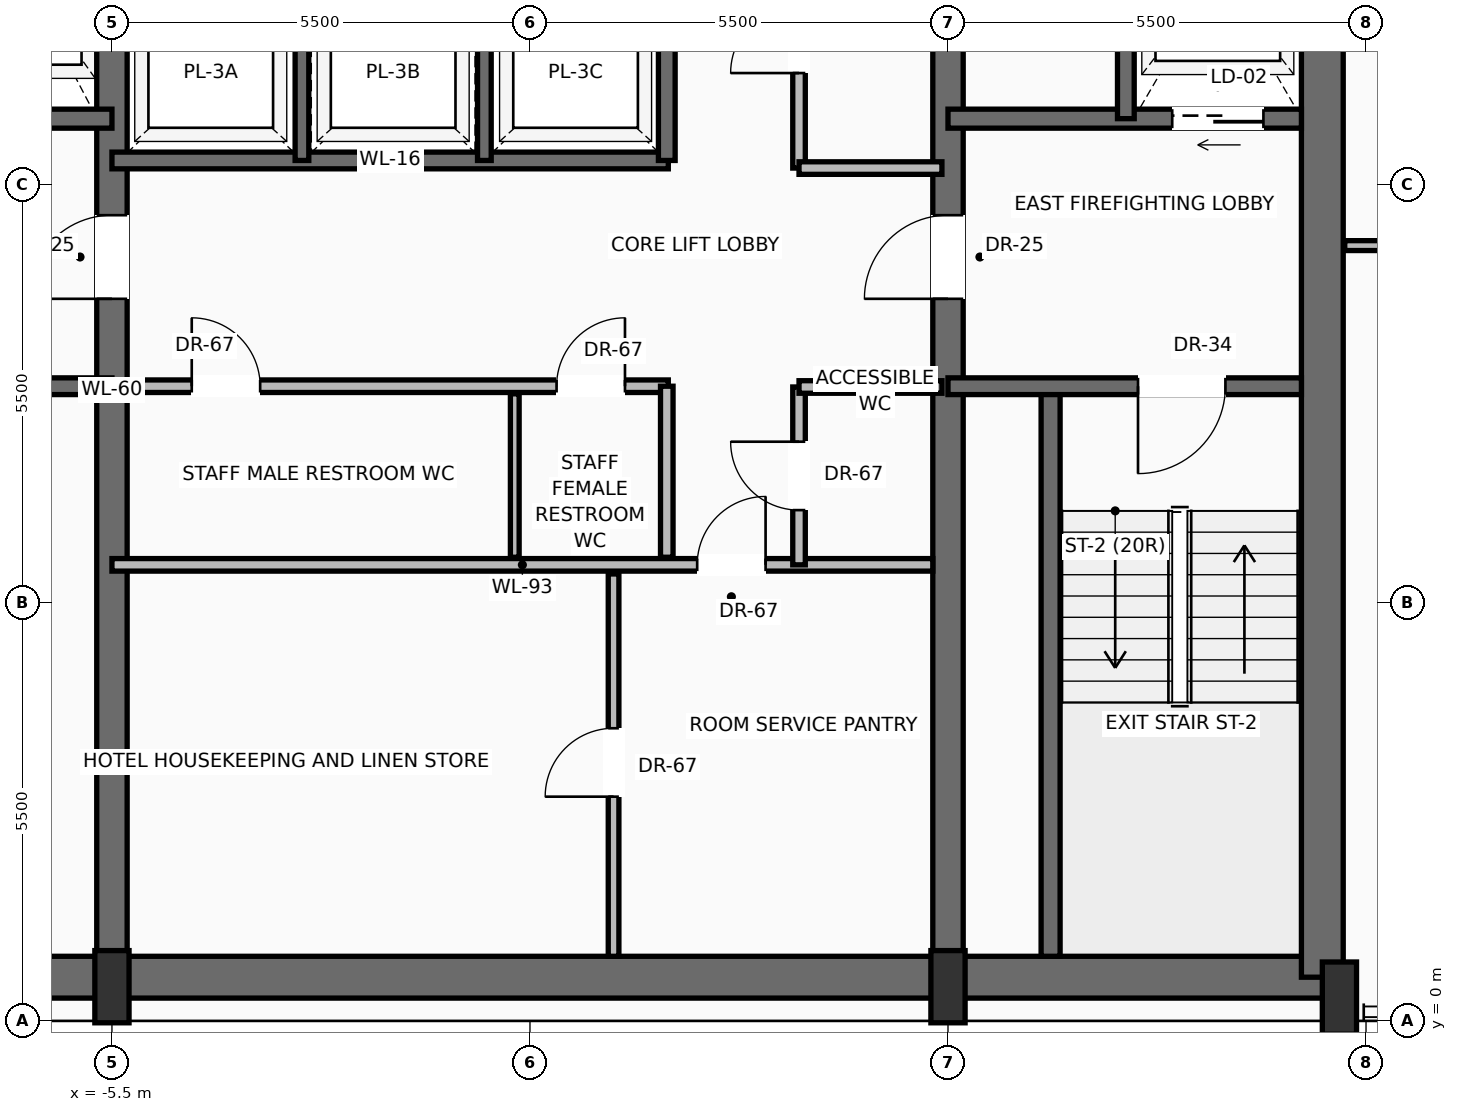
"""IFC4 building model, lengths in metres.
Left out: names, types, materials, properties, quantities, classifications, styles, units other than length and angle.
Written with IfcOpenShell. Run it as: python <this file> out.ifc"""

import sys

from ifc_helpers import new_model, si_unit, direction, frame, frame_2d, origin, origin_2d, place, context, subcontext, project, spatial, rectangle, extrude, source, transform, mapped, element, fill, save


model = new_model("IFC4")
c1 = context("Model", 3, precision=1e-05, world=origin(), true_north=direction((0.0, 1.0)))
c2 = subcontext(c1, "Body", "Model", "MODEL_VIEW")
j1 = project(units=[si_unit("LENGTHUNIT", "METRE"), si_unit("PLANEANGLEUNIT", "RADIAN")], contexts=[c1])
p1 = place(None, origin())
s1 = spatial("IfcSite", under=j1, at=p1, CompositionType="ELEMENT")
p2 = place(p1, origin())
s2 = spatial("IfcBuilding", under=s1, at=p2, CompositionType="ELEMENT")
p3 = place(p2, frame((0.0, 0.0, 251.05)))
s3 = spatial("IfcBuildingStorey", under=s2, at=p3, CompositionType="ELEMENT", Elevation=251.05)
p4 = place(p3, frame((-10.65, 0.575, 0.0), z_axis=(0.0, 0.0, 1.0), x_axis=(1.0, 0.0, 0.0)))
e1 = element("IfcWall", 1, at=p4, inside=s3, PredefinedType="SHEAR", context=c2, shape_type="SweptSolid", body=[
    extrude(rectangle(XDim=21.3, YDim=0.55, at=frame_2d((10.65, 0.0))), origin(), (0.0, 0.0, 1.0), 3.24),
])
p5 = place(p3, frame((10.425, 0.575, 0.0), z_axis=(0.0, 0.0, 1.0), x_axis=(0.0, 1.0, 0.0)))
e2 = element("IfcWall", 2, at=p5, inside=s3, PredefinedType="SHEAR", context=c2, shape_type="SweptSolid", body=[
    extrude(rectangle(XDim=15.45, YDim=0.55, at=frame_2d((7.725, 0.0))), origin(), (0.0, 0.0, 1.0), 3.24),
])
p6 = place(p3, frame((-5.5, 0.575, 0.0), z_axis=(0.0, 0.0, 1.0), x_axis=(0.0, 1.0, 0.0)))
e3 = element("IfcWall", 3, at=p6, inside=s3, PredefinedType="SHEAR", context=c2, shape_type="SweptSolid", body=[
    extrude(rectangle(XDim=15.45, YDim=0.4, at=frame_2d((7.725, 0.0))), origin(), (0.0, 0.0, 1.0), 3.24),
])
p7 = place(p6, frame((8.925, 0.0, 0.0)))
e4 = element("IfcOpeningElement", 4, at=p7, cuts=e3, PredefinedType="OPENING", context=c2, shape_type="SweptSolid", body=[
    extrude(rectangle(XDim=1.1, YDim=2.2, at=frame_2d((0.55, 1.1))), frame((0.0, 0.21, 0.0), z_axis=(0.0, -1.0, 0.0), x_axis=(1.0, 0.0, 0.0)), (0.0, 0.0, 1.0), 0.42),
])
p8 = place(p3, frame((5.5, 0.575, 0.0), z_axis=(0.0, 0.0, 1.0), x_axis=(0.0, 1.0, 0.0)))
e5 = element("IfcWall", 5, at=p8, inside=s3, PredefinedType="SHEAR", context=c2, shape_type="SweptSolid", body=[
    extrude(rectangle(XDim=15.45, YDim=0.4, at=frame_2d((7.725, 0.0))), origin(), (0.0, 0.0, 1.0), 3.24),
])
p9 = place(p8, frame((8.925, 0.0, 0.0)))
e6 = element("IfcOpeningElement", 6, at=p9, cuts=e5, PredefinedType="OPENING", context=c2, shape_type="SweptSolid", body=[
    extrude(rectangle(XDim=1.1, YDim=2.2, at=frame_2d((0.55, 1.1))), frame((0.0, 0.21, 0.0), z_axis=(0.0, -1.0, 0.0), x_axis=(1.0, 0.0, 0.0)), (0.0, 0.0, 1.0), 0.42),
])
m1 = source(origin(), c2, "Body", "SweptSolid", [
    extrude(rectangle(XDim=0.45, YDim=0.95, at=origin_2d()), origin(), (0.0, 0.0, 1.0), 3.45),
])
for number, where, z_axis, x_axis in (
    (7, (-5.5, 0.45, 0.0), (0.0, 0.0, 1.0), (1.0, 0.0, 0.0)),
    (8, (5.5, 0.45, 0.0), (0.0, 0.0, 1.0), (1.0, 0.0, 0.0)),
    (9, (10.65, 0.3, 0.0), (0.0, 0.0, 1.0), (1.0, 0.0, 0.0)),
):
    element("IfcColumn", number, at=place(p3, frame(where, z_axis=z_axis, x_axis=x_axis)), inside=s3, PredefinedType="PILASTER", context=c2, shape_type="MappedRepresentation", body=[
        mapped(m1, transform((0.0, 0.0, 0.0), scale=1.0)),
    ])
p10 = place(p3, frame((-5.5, 8.35, 0.0), z_axis=(0.0, 0.0, 1.0), x_axis=(-1.0, 0.0, 0.0)))
e10 = element("IfcWall", 10, at=p10, inside=s3, PredefinedType="SOLIDWALL", context=c2, shape_type="SweptSolid", body=[
    extrude(rectangle(XDim=4.65, YDim=0.22, at=frame_2d((2.325, 0.0))), origin(), (0.0, 0.0, 1.0), 3.24),
])
p11 = place(p10, frame((2.5, 0.0, 0.0)))
e11 = element("IfcOpeningElement", 11, at=p11, cuts=e10, PredefinedType="OPENING", context=c2, shape_type="SweptSolid", body=[
    extrude(rectangle(XDim=1.15, YDim=2.2, at=frame_2d((0.575, 1.1))), frame((0.0, 0.12, 0.0), z_axis=(0.0, -1.0, 0.0), x_axis=(1.0, 0.0, 0.0)), (0.0, 0.0, 1.0), 0.24),
])
p12 = place(p3, frame((-5.5, 11.87, 0.0), z_axis=(0.0, 0.0, 1.0), x_axis=(-1.0, 0.0, 0.0)))
e12 = element("IfcWall", 12, at=p12, inside=s3, PredefinedType="SOLIDWALL", context=c2, shape_type="SweptSolid", body=[
    extrude(rectangle(XDim=4.65, YDim=0.25, at=frame_2d((2.325, 0.0))), origin(), (0.0, 0.0, 1.0), 3.24),
])
p13 = place(p12, frame((2.95, 0.0, 0.0)))
e13 = element("IfcOpeningElement", 13, at=p13, cuts=e12, PredefinedType="OPENING", context=c2, shape_type="SweptSolid", body=[
    extrude(rectangle(XDim=1.2, YDim=2.25, at=frame_2d((0.6, 1.125))), frame((0.0, 0.135, 0.0), z_axis=(0.0, -1.0, 0.0), x_axis=(1.0, 0.0, 0.0)), (0.0, 0.0, 1.0), 0.27),
])
p14 = place(p3, frame((6.85, 0.85, 0.0), z_axis=(0.0, 0.0, 1.0), x_axis=(0.0, 1.0, 0.0)))
e14 = element("IfcWall", 14, at=p14, inside=s3, PredefinedType="SOLIDWALL", context=c2, shape_type="SweptSolid", body=[
    extrude(rectangle(XDim=7.5, YDim=0.25, at=frame_2d((3.75, 0.0))), origin(), (0.0, 0.0, 1.0), 3.24),
])
p15 = place(p3, frame((10.15, 8.35, 0.0), z_axis=(0.0, 0.0, 1.0), x_axis=(-1.0, 0.0, 0.0)))
e15 = element("IfcWall", 15, at=p15, inside=s3, PredefinedType="SOLIDWALL", context=c2, shape_type="SweptSolid", body=[
    extrude(rectangle(XDim=4.65, YDim=0.22, at=frame_2d((2.325, 0.0))), origin(), (0.0, 0.0, 1.0), 3.24),
])
p16 = place(p15, frame((1.0, 0.0, 0.0)))
e16 = element("IfcOpeningElement", 16, at=p16, cuts=e15, PredefinedType="OPENING", context=c2, shape_type="SweptSolid", body=[
    extrude(rectangle(XDim=1.15, YDim=2.2, at=frame_2d((0.575, 1.1))), frame((0.0, 0.12, 0.0), z_axis=(0.0, -1.0, 0.0), x_axis=(1.0, 0.0, 0.0)), (0.0, 0.0, 1.0), 0.24),
])
p17 = place(p3, frame((10.15, 11.87, 0.0), z_axis=(0.0, 0.0, 1.0), x_axis=(-1.0, 0.0, 0.0)))
e17 = element("IfcWall", 17, at=p17, inside=s3, PredefinedType="SOLIDWALL", context=c2, shape_type="SweptSolid", body=[
    extrude(rectangle(XDim=4.65, YDim=0.25, at=frame_2d((2.325, 0.0))), origin(), (0.0, 0.0, 1.0), 3.24),
])
p18 = place(p17, frame((0.5, 0.0, 0.0)))
e18 = element("IfcOpeningElement", 18, at=p18, cuts=e17, PredefinedType="OPENING", context=c2, shape_type="SweptSolid", body=[
    extrude(rectangle(XDim=1.2, YDim=2.25, at=frame_2d((0.6, 1.125))), frame((0.0, 0.135, 0.0), z_axis=(0.0, -1.0, 0.0), x_axis=(1.0, 0.0, 0.0)), (0.0, 0.0, 1.0), 0.27),
])
p19 = place(p3, frame((7.84, 11.87, 0.0), z_axis=(0.0, 0.0, 1.0), x_axis=(0.0, 1.0, 0.0)))
e19 = element("IfcWall", 19, at=p19, inside=s3, PredefinedType="SOLIDWALL", context=c2, shape_type="SweptSolid", body=[
    extrude(rectangle(XDim=3.88, YDim=0.22, at=frame_2d((1.94, 0.0))), origin(), (0.0, 0.0, 1.0), 3.24),
])
p20 = place(p3, frame((-5.5, 6.0, 0.0), z_axis=(0.0, 0.0, 1.0), x_axis=(1.0, 0.0, 0.0)))
e20 = element("IfcWall", 20, at=p20, inside=s3, PredefinedType="PARTITIONING", context=c2, shape_type="SweptSolid", body=[
    extrude(rectangle(XDim=10.8, YDim=0.165, at=frame_2d((5.4, 0.0))), origin(), (0.0, 0.0, 1.0), 3.232),
])
p21 = place(p20, frame((7.7, 0.0, 0.0)))
e21 = element("IfcOpeningElement", 21, at=p21, cuts=e20, PredefinedType="OPENING", context=c2, shape_type="SweptSolid", body=[
    extrude(rectangle(XDim=0.9, YDim=2.1, at=frame_2d((0.45, 1.05))), frame((0.0, 0.093, 0.0), z_axis=(0.0, -1.0, 0.0), x_axis=(1.0, 0.0, 0.0)), (0.0, 0.0, 1.0), 0.185),
])
p22 = place(p3, frame((1.1, 0.85, 0.0), z_axis=(0.0, 0.0, 1.0), x_axis=(0.0, 1.0, 0.0)))
e22 = element("IfcWall", 22, at=p22, inside=s3, PredefinedType="PARTITIONING", context=c2, shape_type="SweptSolid", body=[
    extrude(rectangle(XDim=5.03, YDim=0.14, at=frame_2d((2.515, 0.0))), origin(), (0.0, 0.0, 1.0), 3.232),
])
p23 = place(p22, frame((2.1, 0.0, 0.0)))
e23 = element("IfcOpeningElement", 23, at=p23, cuts=e22, PredefinedType="OPENING", context=c2, shape_type="SweptSolid", body=[
    extrude(rectangle(XDim=0.9, YDim=2.1, at=frame_2d((0.45, 1.05))), frame((0.0, 0.08, 0.0), z_axis=(0.0, -1.0, 0.0), x_axis=(1.0, 0.0, 0.0)), (0.0, 0.0, 1.0), 0.16),
])
p24 = place(p3, frame((3.54, 6.0, 0.0), z_axis=(0.0, 0.0, 1.0), x_axis=(0.0, 1.0, 0.0)))
e24 = element("IfcWall", 24, at=p24, inside=s3, PredefinedType="PARTITIONING", context=c2, shape_type="SweptSolid", body=[
    extrude(rectangle(XDim=2.34, YDim=0.165, at=frame_2d((1.17, 0.0))), origin(), (0.0, 0.0, 1.0), 3.232),
])
p25 = place(p24, frame((0.72, 0.0, 0.0)))
e25 = element("IfcOpeningElement", 25, at=p25, cuts=e24, PredefinedType="OPENING", context=c2, shape_type="SweptSolid", body=[
    extrude(rectangle(XDim=0.9, YDim=2.1, at=frame_2d((0.45, 1.05))), frame((0.0, 0.093, 0.0), z_axis=(0.0, -1.0, 0.0), x_axis=(1.0, 0.0, 0.0)), (0.0, 0.0, 1.0), 0.185),
])
p26 = place(p3, frame((3.54, 8.34, 0.0), z_axis=(0.0, 0.0, 1.0), x_axis=(1.0, 0.0, 0.0)))
e26 = element("IfcWall", 26, at=p26, inside=s3, PredefinedType="PARTITIONING", context=c2, shape_type="SweptSolid", body=[
    extrude(rectangle(XDim=1.88, YDim=0.165, at=frame_2d((0.94, 0.0))), origin(), (0.0, 0.0, 1.0), 3.232),
])
p27 = place(p3, frame((-5.3, 8.35, 0.0), z_axis=(0.0, 0.0, 1.0), x_axis=(1.0, 0.0, 0.0)))
e27 = element("IfcWall", 27, at=p27, inside=s3, PredefinedType="PARTITIONING", context=c2, shape_type="SweptSolid", body=[
    extrude(rectangle(XDim=7.12, YDim=0.165, at=frame_2d((3.56, 0.0))), origin(), (0.0, 0.0, 1.0), 3.232),
])
p28 = place(p27, frame((0.85, 0.0, 0.0)))
e28 = element("IfcOpeningElement", 28, at=p28, cuts=e27, PredefinedType="OPENING", context=c2, shape_type="SweptSolid", body=[
    extrude(rectangle(XDim=0.9, YDim=2.1, at=frame_2d((0.45, 1.05))), frame((0.0, 0.093, 0.0), z_axis=(0.0, -1.0, 0.0), x_axis=(1.0, 0.0, 0.0)), (0.0, 0.0, 1.0), 0.185),
])
p29 = place(p27, frame((5.65, 0.0, 0.0)))
e29 = element("IfcOpeningElement", 29, at=p29, cuts=e27, PredefinedType="OPENING", context=c2, shape_type="SweptSolid", body=[
    extrude(rectangle(XDim=0.9, YDim=2.1, at=frame_2d((0.45, 1.05))), frame((0.0, 0.093, 0.0), z_axis=(0.0, -1.0, 0.0), x_axis=(1.0, 0.0, 0.0)), (0.0, 0.0, 1.0), 0.185),
])
p30 = place(p3, frame((1.8, 6.1, 0.0), z_axis=(0.0, 0.0, 1.0), x_axis=(0.0, 1.0, 0.0)))
e30 = element("IfcWall", 30, at=p30, inside=s3, PredefinedType="PARTITIONING", context=c2, shape_type="SweptSolid", body=[
    extrude(rectangle(XDim=2.25, YDim=0.165, at=frame_2d((1.125, 0.0))), origin(), (0.0, 0.0, 1.0), 3.232),
])
p31 = place(p3, frame((-0.2, 6.1, 0.0), z_axis=(0.0, 0.0, 1.0), x_axis=(0.0, 1.0, 0.0)))
e31 = element("IfcWall", 31, at=p31, inside=s3, PredefinedType="PARTITIONING", context=c2, shape_type="SweptSolid", body=[
    extrude(rectangle(XDim=2.15, YDim=0.115, at=frame_2d((1.075, 0.0))), origin(), (0.0, 0.0, 1.0), 3.232),
])
p32 = place(p3, frame((-5.5, 11.32, 0.0), z_axis=(0.0, 0.0, 1.0), x_axis=(1.0, 0.0, 0.0)))
e32 = element("IfcWall", 32, at=p32, inside=s3, PredefinedType="SOLIDWALL", context=c2, shape_type="SweptSolid", body=[
    extrude(rectangle(XDim=7.32, YDim=0.22, at=frame_2d((3.66, 0.0))), origin(), (0.0, 0.0, 1.0), 3.24),
])
p33 = place(p3, frame((1.8, 11.32, 0.0), z_axis=(0.0, 0.0, 1.0), x_axis=(0.0, 1.0, 0.0)))
e33 = element("IfcWall", 33, at=p33, inside=s3, PredefinedType="SOLIDWALL", context=c2, shape_type="SweptSolid", body=[
    extrude(rectangle(XDim=2.3, YDim=0.22, at=frame_2d((1.15, 0.0))), origin(), (0.0, 0.0, 1.0), 3.24),
])
for number, where, z_axis, x_axis in (
    (34, (-3.0, 11.32, 0.0), (0.0, 0.0, 1.0), (0.0, 1.0, 0.0)),
    (35, (-0.6, 11.32, 0.0), (0.0, 0.0, 1.0), (0.0, 1.0, 0.0)),
):
    element("IfcWall", number, at=place(p3, frame(where, z_axis=z_axis, x_axis=x_axis)), inside=s3, PredefinedType="SOLIDWALL", context=c2, shape_type="SweptSolid", body=[
        extrude(rectangle(XDim=2.3, YDim=0.18, at=frame_2d((1.15, 0.0))), origin(), (0.0, 0.0, 1.0), 3.24),
    ])
p34 = place(p3, frame((3.54, 11.22, 0.0), z_axis=(0.0, 0.0, 1.0), x_axis=(0.0, 1.0, 0.0)))
e36 = element("IfcWall", 36, at=p34, inside=s3, PredefinedType="PARTITIONING", context=c2, shape_type="SweptSolid", body=[
    extrude(rectangle(XDim=4.53, YDim=0.165, at=frame_2d((2.265, 0.0))), origin(), (0.0, 0.0, 1.0), 3.232),
])
p35 = place(p34, frame((1.25, 0.0, 0.0)))
e37 = element("IfcOpeningElement", 37, at=p35, cuts=e36, PredefinedType="OPENING", context=c2, shape_type="SweptSolid", body=[
    extrude(rectangle(XDim=0.9, YDim=2.1, at=frame_2d((0.45, 1.05))), frame((0.0, 0.093, 0.0), z_axis=(0.0, -1.0, 0.0), x_axis=(1.0, 0.0, 0.0)), (0.0, 0.0, 1.0), 0.185),
])
p36 = place(p3, frame((3.54, 11.22, 0.0), z_axis=(0.0, 0.0, 1.0), x_axis=(1.0, 0.0, 0.0)))
e38 = element("IfcWall", 38, at=p36, inside=s3, PredefinedType="PARTITIONING", context=c2, shape_type="SweptSolid", body=[
    extrude(rectangle(XDim=1.88, YDim=0.165, at=frame_2d((0.94, 0.0))), origin(), (0.0, 0.0, 1.0), 3.232),
])
p37 = place(p3, frame((10.72, 10.2, 0.0), z_axis=(0.0, 0.0, 1.0), x_axis=(1.0, 0.0, 0.0)))
e39 = element("IfcWall", 39, at=p37, inside=s3, PredefinedType="PARTITIONING", context=c2, shape_type="SweptSolid", body=[
    extrude(rectangle(XDim=10.972, YDim=0.13, at=frame_2d((5.486, 0.0))), origin(), (0.0, 0.0, 1.0), 3.232),
])
p38 = place(p37, frame((4.496, 0.0, 0.0)))
e40 = element("IfcOpeningElement", 40, at=p38, cuts=e39, PredefinedType="OPENING", context=c2, shape_type="SweptSolid", body=[
    extrude(rectangle(XDim=0.95, YDim=2.2, at=frame_2d((0.475, 1.1))), frame((0.0, 0.075, 0.0), z_axis=(0.0, -1.0, 0.0), x_axis=(1.0, 0.0, 0.0)), (0.0, 0.0, 1.0), 0.15),
])
m2 = source(origin(), c2, "Body", "SweptSolid", [
    extrude(rectangle(XDim=1.1, YDim=2.2, at=frame_2d((0.55, 1.1))), frame((0.0, 0.025, 0.0), z_axis=(0.0, -1.0, 0.0), x_axis=(1.0, 0.0, 0.0)), (0.0, 0.0, 1.0), 0.05),
])
p39 = place(p7, origin())
e41 = element("IfcDoor", 41, at=p39, inside=s3, OperationType="SINGLE_SWING_LEFT", PredefinedType="DOOR", context=c2, shape_type="MappedRepresentation", body=[
    mapped(m2, transform((0.0, 0.0, 0.0), scale=1.0)),
])
fill(e4, e41)
m3 = source(origin(), c2, "Body", "SweptSolid", [
    extrude(rectangle(XDim=1.15, YDim=2.2, at=frame_2d((0.575, 1.1))), frame((0.0, 0.025, 0.0), z_axis=(0.0, -1.0, 0.0), x_axis=(1.0, 0.0, 0.0)), (0.0, 0.0, 1.0), 0.05),
])
p40 = place(p16, origin())
e42 = element("IfcDoor", 42, at=p40, inside=s3, OperationType="SINGLE_SWING_RIGHT", PredefinedType="DOOR", context=c2, shape_type="MappedRepresentation", body=[
    mapped(m3, transform((0.0, 0.0, 0.0), scale=1.0)),
])
fill(e16, e42)
p41 = place(p9, origin())
e43 = element("IfcDoor", 43, at=p41, inside=s3, OperationType="SINGLE_SWING_LEFT", PredefinedType="DOOR", context=c2, shape_type="MappedRepresentation", body=[
    mapped(m2, transform((0.0, 0.0, 0.0), scale=1.0)),
])
fill(e6, e43)
m4 = source(origin(), c2, "Body", "SweptSolid", [
    extrude(rectangle(XDim=1.2, YDim=2.25, at=frame_2d((0.6, 1.125))), frame((0.0, 0.025, 0.0), z_axis=(0.0, -1.0, 0.0), x_axis=(1.0, 0.0, 0.0)), (0.0, 0.0, 1.0), 0.05),
])
p42 = place(p18, origin())
e44 = element("IfcDoor", 44, at=p42, inside=s3, OperationType="SLIDING_TO_RIGHT", PredefinedType="DOOR", context=c2, shape_type="MappedRepresentation", body=[
    mapped(m4, transform((0.0, 0.0, 0.0), scale=1.0)),
])
fill(e18, e44)
m5 = source(origin(), c2, "Body", "SweptSolid", [
    extrude(rectangle(XDim=0.9, YDim=2.1, at=frame_2d((0.45, 1.05))), frame((0.0, 0.025, 0.0), z_axis=(0.0, -1.0, 0.0), x_axis=(1.0, 0.0, 0.0)), (0.0, 0.0, 1.0), 0.05),
])
p43 = place(p21, origin())
e45 = element("IfcDoor", 45, at=p43, inside=s3, OperationType="SINGLE_SWING_RIGHT", PredefinedType="DOOR", context=c2, shape_type="MappedRepresentation", body=[
    mapped(m5, transform((0.0, 0.0, 0.0), scale=1.0)),
])
fill(e21, e45)
p44 = place(p23, origin())
e46 = element("IfcDoor", 46, at=p44, inside=s3, OperationType="SINGLE_SWING_LEFT", PredefinedType="DOOR", context=c2, shape_type="MappedRepresentation", body=[
    mapped(m5, transform((0.0, 0.0, 0.0), scale=1.0)),
])
fill(e23, e46)
p45 = place(p25, origin())
e47 = element("IfcDoor", 47, at=p45, inside=s3, OperationType="SINGLE_SWING_RIGHT", PredefinedType="DOOR", context=c2, shape_type="MappedRepresentation", body=[
    mapped(m5, transform((0.0, 0.0, 0.0), scale=1.0)),
])
fill(e25, e47)
p46 = place(p28, origin())
e48 = element("IfcDoor", 48, at=p46, inside=s3, OperationType="SINGLE_SWING_LEFT", PredefinedType="DOOR", context=c2, shape_type="MappedRepresentation", body=[
    mapped(m5, transform((0.0, 0.0, 0.0), scale=1.0)),
])
fill(e28, e48)
p47 = place(p29, origin())
e49 = element("IfcDoor", 49, at=p47, inside=s3, OperationType="SINGLE_SWING_RIGHT", PredefinedType="DOOR", context=c2, shape_type="MappedRepresentation", body=[
    mapped(m5, transform((0.0, 0.0, 0.0), scale=1.0)),
])
fill(e29, e49)
p48 = place(p35, origin())
e50 = element("IfcDoor", 50, at=p48, inside=s3, OperationType="SINGLE_SWING_LEFT", PredefinedType="DOOR", context=c2, shape_type="MappedRepresentation", body=[
    mapped(m5, transform((0.0, 0.0, 0.0), scale=1.0)),
])
fill(e37, e50)
save(model, sys.argv[1])
